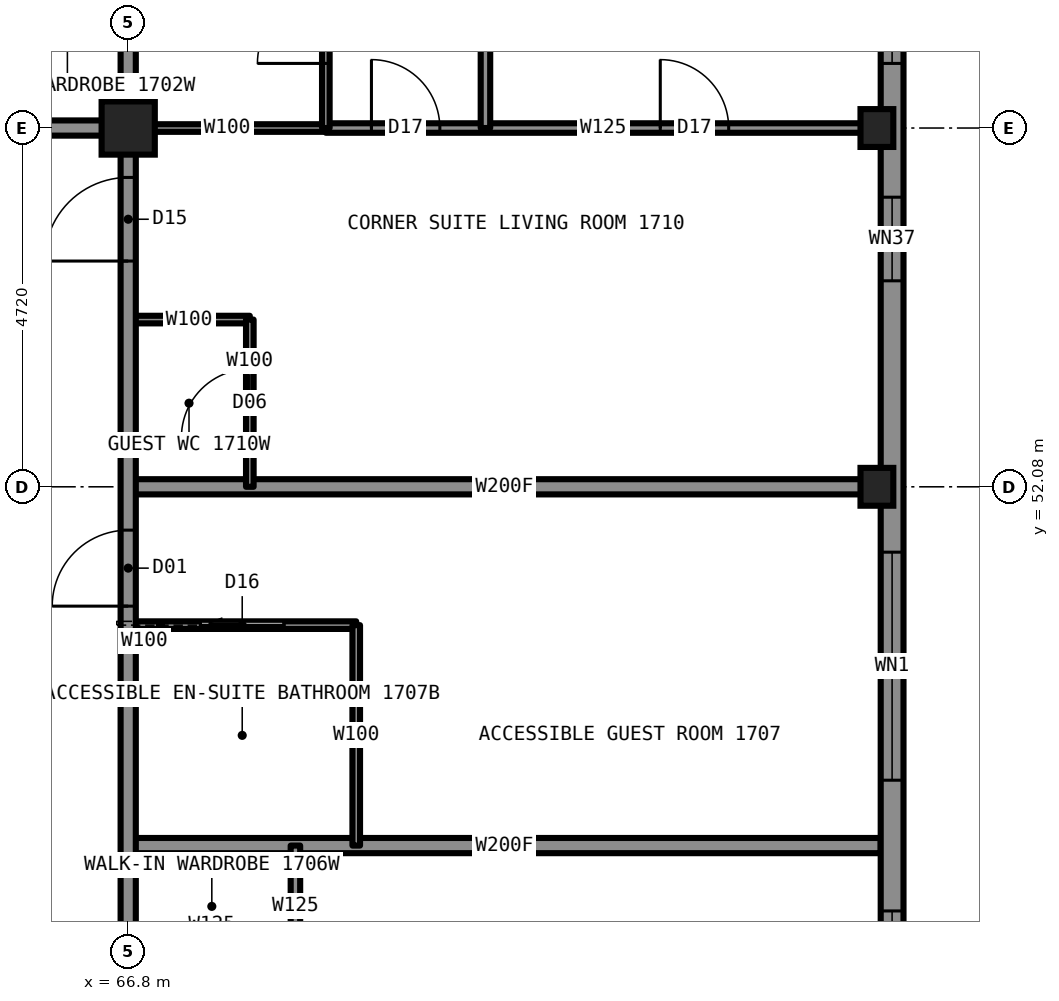
"""IFC4 building model, lengths in metres.
Left out: names, types, materials, properties, quantities, classifications, styles, units other than length and angle.
Written with IfcOpenShell. Run it as: python <this file> out.ifc"""

import sys

from ifc_helpers import new_model, si_unit, direction, frame, frame_2d, origin, origin_2d, place, context, subcontext, project, spatial, rectangle, hollow_rectangle, i_section, extrude, element, fill, save


model = new_model("IFC4")
c1 = context("Model", 3, precision=1e-05, world=origin(), true_north=direction((0.0, 1.0)))
c2 = subcontext(c1, "Body", "Model", "MODEL_VIEW")
j1 = project(units=[si_unit("LENGTHUNIT", "METRE"), si_unit("PLANEANGLEUNIT", "RADIAN")], contexts=[c1])
p1 = place(None, origin())
s1 = spatial("IfcSite", under=j1, at=p1, CompositionType="ELEMENT")
p2 = place(p1, origin())
s2 = spatial("IfcBuilding", under=s1, at=p2, CompositionType="ELEMENT")
p3 = place(p2, frame((0.0, 0.0, 60.0)))
s3 = spatial("IfcBuildingStorey", under=s2, at=p3, CompositionType="ELEMENT", Elevation=60.0)
for number, where, z_axis, x_axis in (
    (1, (76.65, 52.08, 0.0), (0.0, 0.0, 1.0), (1.0, 0.0, 0.0)),
    (2, (76.65, 56.8, 0.0), (0.0, 0.0, 1.0), (1.0, 0.0, 0.0)),
):
    element("IfcColumn", number, at=place(p3, frame(where, z_axis=z_axis, x_axis=x_axis)), inside=s3, PredefinedType="COLUMN", context=c2, shape_type="SweptSolid", body=[
        extrude(i_section(OverallWidth=0.432, OverallDepth=0.498, WebThickness=0.056, FlangeThickness=0.089, at=origin_2d()), origin(), (0.0, 0.0, 1.0), 3.5),
    ])
p4 = place(p3, frame((66.8, 56.8, 0.0), z_axis=(0.0, 0.0, 1.0), x_axis=(1.0, 0.0, 0.0)))
e3 = element("IfcColumn", 3, at=p4, inside=s3, PredefinedType="COLUMN", context=c2, shape_type="SweptSolid", body=[
    extrude(hollow_rectangle(XDim=0.7, YDim=0.7, WallThickness=0.06, at=origin_2d()), origin(), (0.0, 0.0, 1.0), 3.5),
])
p5 = place(p3, frame((66.8, 56.8, 0.0), z_axis=(0.0, 0.0, 1.0), x_axis=(1.0, 0.0, 0.0)))
e4 = element("IfcWall", 4, at=p5, inside=s3, PredefinedType="PARTITIONING", context=c2, shape_type="SweptSolid", body=[
    extrude(rectangle(XDim=2.6, YDim=0.1, at=frame_2d((1.3, 0.0))), origin(), (0.0, 0.0, 1.0), 2.573),
])
p6 = place(p3, frame((43.2, 56.8, 0.0), z_axis=(0.0, 0.0, 1.0), x_axis=(1.0, 0.0, 0.0)))
e5 = element("IfcWall", 5, at=p6, inside=s3, PredefinedType="PARTITIONING", context=c2, shape_type="SweptSolid", body=[
    extrude(rectangle(XDim=23.6, YDim=0.2, at=frame_2d((11.8, 0.0))), origin(), (0.0, 0.0, 1.0), 3.33),
])
p7 = place(p6, frame((1.85, 0.0, 0.0)))
e6 = element("IfcOpeningElement", 6, at=p7, cuts=e5, PredefinedType="OPENING", context=c2, shape_type="SweptSolid", body=[
    extrude(rectangle(XDim=1.1, YDim=2.2, at=frame_2d((0.55, 1.1))), frame((0.0, 0.11, 0.0), z_axis=(0.0, -1.0, 0.0), x_axis=(1.0, 0.0, 0.0)), (0.0, 0.0, 1.0), 0.22),
])
p8 = place(p6, frame((17.16, 0.0, 0.0)))
e7 = element("IfcOpeningElement", 7, at=p8, cuts=e5, PredefinedType="OPENING", context=c2, shape_type="SweptSolid", body=[
    extrude(rectangle(XDim=1.0, YDim=2.2, at=frame_2d((0.5, 1.1))), frame((0.0, 0.11, 0.0), z_axis=(0.0, -1.0, 0.0), x_axis=(1.0, 0.0, 0.0)), (0.0, 0.0, 1.0), 0.22),
])
p9 = place(p3, frame((69.4, 56.8, 0.0), z_axis=(0.0, 0.0, 1.0), x_axis=(1.0, 0.0, 0.0)))
e8 = element("IfcWall", 8, at=p9, inside=s3, PredefinedType="PARTITIONING", context=c2, shape_type="SweptSolid", body=[
    extrude(rectangle(XDim=7.3, YDim=0.125, at=frame_2d((3.65, 0.0))), origin(), (0.0, 0.0, 1.0), 2.573),
])
p10 = place(p9, frame((0.6, 0.0, 0.0)))
e9 = element("IfcOpeningElement", 9, at=p10, cuts=e8, PredefinedType="OPENING", context=c2, shape_type="SweptSolid", body=[
    extrude(rectangle(XDim=0.9, YDim=2.2, at=frame_2d((0.45, 1.1))), frame((0.0, 0.073, 0.0), z_axis=(0.0, -1.0, 0.0), x_axis=(1.0, 0.0, 0.0)), (0.0, 0.0, 1.0), 0.145),
])
p11 = place(p9, frame((4.4, 0.0, 0.0)))
e10 = element("IfcOpeningElement", 10, at=p11, cuts=e8, PredefinedType="OPENING", context=c2, shape_type="SweptSolid", body=[
    extrude(rectangle(XDim=0.9, YDim=2.2, at=frame_2d((0.45, 1.1))), frame((0.0, 0.073, 0.0), z_axis=(0.0, -1.0, 0.0), x_axis=(1.0, 0.0, 0.0)), (0.0, 0.0, 1.0), 0.145),
])
p12 = place(p3, frame((66.8, 47.36, 0.0), z_axis=(0.0, 0.0, 1.0), x_axis=(1.0, 0.0, 0.0)))
e11 = element("IfcWall", 11, at=p12, inside=s3, PredefinedType="PARTITIONING", context=c2, shape_type="SweptSolid", body=[
    extrude(rectangle(XDim=9.9, YDim=0.2, at=frame_2d((4.95, 0.0))), origin(), (0.0, 0.0, 1.0), 2.723),
])
p13 = place(p3, frame((66.8, 50.26, 0.0), z_axis=(0.0, 0.0, 1.0), x_axis=(1.0, 0.0, 0.0)))
e12 = element("IfcWall", 12, at=p13, inside=s3, PredefinedType="PARTITIONING", context=c2, shape_type="SweptSolid", body=[
    extrude(rectangle(XDim=3.0, YDim=0.1, at=frame_2d((1.5, 0.0))), origin(), (0.0, 0.0, 1.0), 3.33),
])
p14 = place(p13, frame((0.95, 0.0, 0.0)))
e13 = element("IfcOpeningElement", 13, at=p14, cuts=e12, PredefinedType="OPENING", context=c2, shape_type="SweptSolid", body=[
    extrude(rectangle(XDim=1.1, YDim=2.1, at=frame_2d((0.55, 1.05))), frame((0.0, 0.06, 0.0), z_axis=(0.0, -1.0, 0.0), x_axis=(1.0, 0.0, 0.0)), (0.0, 0.0, 1.0), 0.12),
])
p15 = place(p3, frame((66.8, 52.08, 0.0), z_axis=(0.0, 0.0, 1.0), x_axis=(1.0, 0.0, 0.0)))
e14 = element("IfcWall", 14, at=p15, inside=s3, PredefinedType="PARTITIONING", context=c2, shape_type="SweptSolid", body=[
    extrude(rectangle(XDim=9.9, YDim=0.2, at=frame_2d((4.95, 0.0))), origin(), (0.0, 0.0, 1.0), 2.573),
])
p16 = place(p3, frame((66.8, 54.28, 0.0), z_axis=(0.0, 0.0, 1.0), x_axis=(1.0, 0.0, 0.0)))
e15 = element("IfcWall", 15, at=p16, inside=s3, PredefinedType="PARTITIONING", context=c2, shape_type="SweptSolid", body=[
    extrude(rectangle(XDim=1.6, YDim=0.1, at=frame_2d((0.8, 0.0))), origin(), (0.0, 0.0, 1.0), 2.723),
])
p17 = place(p3, frame((66.8, 33.22, 0.0), z_axis=(0.0, 0.0, 1.0), x_axis=(0.0, 1.0, 0.0)))
e16 = element("IfcWall", 16, at=p17, inside=s3, PredefinedType="PARTITIONING", context=c2, shape_type="SweptSolid", body=[
    extrude(rectangle(XDim=23.58, YDim=0.2, at=frame_2d((11.79, 0.0))), origin(), (0.0, 0.0, 1.0), 3.33),
])
p18 = place(p17, frame((7.7, 0.0, 0.0)))
e17 = element("IfcOpeningElement", 17, at=p18, cuts=e16, PredefinedType="OPENING", context=c2, shape_type="SweptSolid", body=[
    extrude(rectangle(XDim=1.0, YDim=2.2, at=frame_2d((0.5, 1.1))), frame((0.0, 0.11, 0.0), z_axis=(0.0, -1.0, 0.0), x_axis=(1.0, 0.0, 0.0)), (0.0, 0.0, 1.0), 0.22),
])
p19 = place(p17, frame((17.29, 0.0, 0.0)))
e18 = element("IfcOpeningElement", 18, at=p19, cuts=e16, PredefinedType="OPENING", context=c2, shape_type="SweptSolid", body=[
    extrude(rectangle(XDim=1.0, YDim=2.2, at=frame_2d((0.5, 1.1))), frame((0.0, 0.11, 0.0), z_axis=(0.0, -1.0, 0.0), x_axis=(1.0, 0.0, 0.0)), (0.0, 0.0, 1.0), 0.22),
])
p20 = place(p17, frame((21.83, 0.0, 0.0)))
e19 = element("IfcOpeningElement", 19, at=p20, cuts=e16, PredefinedType="OPENING", context=c2, shape_type="SweptSolid", body=[
    extrude(rectangle(XDim=1.1, YDim=2.2, at=frame_2d((0.55, 1.1))), frame((0.0, 0.11, 0.0), z_axis=(0.0, -1.0, 0.0), x_axis=(1.0, 0.0, 0.0)), (0.0, 0.0, 1.0), 0.22),
])
p21 = place(p17, frame((0.63, 0.0, 0.0)))
e20 = element("IfcOpeningElement", 20, at=p21, cuts=e16, PredefinedType="OPENING", context=c2, shape_type="SweptSolid", body=[
    extrude(rectangle(XDim=1.1, YDim=2.2, at=frame_2d((0.55, 1.1))), frame((0.0, 0.11, 0.0), z_axis=(0.0, -1.0, 0.0), x_axis=(1.0, 0.0, 0.0)), (0.0, 0.0, 1.0), 0.22),
])
p22 = place(p3, frame((66.8, 56.8, 0.0), z_axis=(0.0, 0.0, 1.0), x_axis=(0.0, 1.0, 0.0)))
e21 = element("IfcWall", 21, at=p22, inside=s3, PredefinedType="PARTITIONING", context=c2, shape_type="SweptSolid", body=[
    extrude(rectangle(XDim=9.9, YDim=0.2, at=frame_2d((4.95, 0.0))), origin(), (0.0, 0.0, 1.0), 2.573),
])
p23 = place(p3, frame((68.4, 52.08, 0.0), z_axis=(0.0, 0.0, 1.0), x_axis=(0.0, 1.0, 0.0)))
e22 = element("IfcWall", 22, at=p23, inside=s3, PredefinedType="PARTITIONING", context=c2, shape_type="SweptSolid", body=[
    extrude(rectangle(XDim=2.2, YDim=0.1, at=frame_2d((1.1, 0.0))), origin(), (0.0, 0.0, 1.0), 3.33),
])
p24 = place(p23, frame((0.65, 0.0, 0.0)))
e23 = element("IfcOpeningElement", 23, at=p24, cuts=e22, PredefinedType="OPENING", context=c2, shape_type="SweptSolid", body=[
    extrude(rectangle(XDim=0.9, YDim=2.1, at=frame_2d((0.45, 1.05))), frame((0.0, 0.06, 0.0), z_axis=(0.0, -1.0, 0.0), x_axis=(1.0, 0.0, 0.0)), (0.0, 0.0, 1.0), 0.12),
])
p25 = place(p3, frame((69.0, 45.76, 0.0), z_axis=(0.0, 0.0, 1.0), x_axis=(0.0, 1.0, 0.0)))
e24 = element("IfcWall", 24, at=p25, inside=s3, PredefinedType="PARTITIONING", context=c2, shape_type="SweptSolid", body=[
    extrude(rectangle(XDim=1.6, YDim=0.125, at=frame_2d((0.8, 0.0))), origin(), (0.0, 0.0, 1.0), 3.33),
])
p26 = place(p3, frame((69.4, 56.8, 0.0), z_axis=(0.0, 0.0, 1.0), x_axis=(0.0, 1.0, 0.0)))
e25 = element("IfcWall", 25, at=p26, inside=s3, PredefinedType="PARTITIONING", context=c2, shape_type="SweptSolid", body=[
    extrude(rectangle(XDim=2.6, YDim=0.1, at=frame_2d((1.3, 0.0))), origin(), (0.0, 0.0, 1.0), 3.33),
])
p27 = place(p26, frame((0.85, 0.0, 0.0)))
e26 = element("IfcOpeningElement", 26, at=p27, cuts=e25, PredefinedType="OPENING", context=c2, shape_type="SweptSolid", body=[
    extrude(rectangle(XDim=0.9, YDim=2.1, at=frame_2d((0.45, 1.05))), frame((0.0, 0.06, 0.0), z_axis=(0.0, -1.0, 0.0), x_axis=(1.0, 0.0, 0.0)), (0.0, 0.0, 1.0), 0.12),
])
p28 = place(p3, frame((69.8, 47.36, 0.0), z_axis=(0.0, 0.0, 1.0), x_axis=(0.0, 1.0, 0.0)))
e27 = element("IfcWall", 27, at=p28, inside=s3, PredefinedType="PARTITIONING", context=c2, shape_type="SweptSolid", body=[
    extrude(rectangle(XDim=2.9, YDim=0.1, at=frame_2d((1.45, 0.0))), origin(), (0.0, 0.0, 1.0), 3.33),
])
p29 = place(p3, frame((71.5, 56.8, 0.0), z_axis=(0.0, 0.0, 1.0), x_axis=(0.0, 1.0, 0.0)))
e28 = element("IfcWall", 28, at=p29, inside=s3, PredefinedType="PARTITIONING", context=c2, shape_type="SweptSolid", body=[
    extrude(rectangle(XDim=9.894, YDim=0.125, at=frame_2d((4.947, 0.0))), origin(), (0.0, 0.0, 1.0), 3.33),
])
p30 = place(p3, frame((76.85, 28.5, 0.0), z_axis=(0.0, 0.0, 1.0), x_axis=(0.0, 1.0, 0.0)))
e29 = element("IfcWall", 29, at=p30, inside=s3, PredefinedType="SOLIDWALL", context=c2, shape_type="SweptSolid", body=[
    extrude(rectangle(XDim=33.0, YDim=0.3, at=frame_2d((16.5, 0.0))), origin(), (0.0, 0.0, 1.0), 2.83),
])
p31 = place(p30, frame((0.85, 0.0, 0.5)))
e30 = element("IfcOpeningElement", 30, at=p31, cuts=e29, PredefinedType="OPENING", context=c2, shape_type="SweptSolid", body=[
    extrude(rectangle(XDim=3.0, YDim=2.0, at=frame_2d((1.5, 1.0))), frame((0.0, 0.16, 0.0), z_axis=(0.0, -1.0, 0.0), x_axis=(1.0, 0.0, 0.0)), (0.0, 0.0, 1.0), 0.32),
])
p32 = place(p30, frame((5.56, 0.0, 0.5)))
e31 = element("IfcOpeningElement", 31, at=p32, cuts=e29, PredefinedType="OPENING", context=c2, shape_type="SweptSolid", body=[
    extrude(rectangle(XDim=3.0, YDim=2.0, at=frame_2d((1.5, 1.0))), frame((0.0, 0.16, 0.0), z_axis=(0.0, -1.0, 0.0), x_axis=(1.0, 0.0, 0.0)), (0.0, 0.0, 1.0), 0.32),
])
p33 = place(p30, frame((10.28, 0.0, 0.5)))
e32 = element("IfcOpeningElement", 32, at=p33, cuts=e29, PredefinedType="OPENING", context=c2, shape_type="SweptSolid", body=[
    extrude(rectangle(XDim=1.2, YDim=1.7, at=frame_2d((0.6, 0.85))), frame((0.0, 0.16, 0.0), z_axis=(0.0, -1.0, 0.0), x_axis=(1.0, 0.0, 0.0)), (0.0, 0.0, 1.0), 0.32),
])
p34 = place(p30, frame((15.0, 0.0, 0.5)))
e33 = element("IfcOpeningElement", 33, at=p34, cuts=e29, PredefinedType="OPENING", context=c2, shape_type="SweptSolid", body=[
    extrude(rectangle(XDim=3.0, YDim=2.0, at=frame_2d((1.5, 1.0))), frame((0.0, 0.16, 0.0), z_axis=(0.0, -1.0, 0.0), x_axis=(1.0, 0.0, 0.0)), (0.0, 0.0, 1.0), 0.32),
])
p35 = place(p30, frame((21.52, 0.0, 0.5)))
e34 = element("IfcOpeningElement", 34, at=p35, cuts=e29, PredefinedType="OPENING", context=c2, shape_type="SweptSolid", body=[
    extrude(rectangle(XDim=1.2, YDim=1.7, at=frame_2d((0.6, 0.85))), frame((0.0, 0.16, 0.0), z_axis=(0.0, -1.0, 0.0), x_axis=(1.0, 0.0, 0.0)), (0.0, 0.0, 1.0), 0.32),
])
p36 = place(p30, frame((24.44, 0.0, 0.5)))
e35 = element("IfcOpeningElement", 35, at=p36, cuts=e29, PredefinedType="OPENING", context=c2, shape_type="SweptSolid", body=[
    extrude(rectangle(XDim=3.0, YDim=2.0, at=frame_2d((1.5, 1.0))), frame((0.0, 0.16, 0.0), z_axis=(0.0, -1.0, 0.0), x_axis=(1.0, 0.0, 0.0)), (0.0, 0.0, 1.0), 0.32),
])
p37 = place(p30, frame((29.15, 0.0, 0.5)))
e36 = element("IfcOpeningElement", 36, at=p37, cuts=e29, PredefinedType="OPENING", context=c2, shape_type="SweptSolid", body=[
    extrude(rectangle(XDim=3.0, YDim=2.0, at=frame_2d((1.5, 1.0))), frame((0.0, 0.16, 0.0), z_axis=(0.0, -1.0, 0.0), x_axis=(1.0, 0.0, 0.0)), (0.0, 0.0, 1.0), 0.32),
])
p38 = place(p30, frame((11.48, 0.0, 0.5)))
e37 = element("IfcOpeningElement", 37, at=p38, cuts=e29, PredefinedType="OPENING", context=c2, shape_type="SweptSolid", body=[
    extrude(rectangle(XDim=0.6, YDim=0.8, at=frame_2d((0.3, 0.4))), frame((0.0, 0.16, 0.0), z_axis=(0.0, -1.0, 0.0), x_axis=(1.0, 0.0, 0.0)), (0.0, 0.0, 1.0), 0.32),
])
p39 = place(p30, frame((20.87, 0.0, 0.5)))
e38 = element("IfcOpeningElement", 38, at=p39, cuts=e29, PredefinedType="OPENING", context=c2, shape_type="SweptSolid", body=[
    extrude(rectangle(XDim=0.6, YDim=0.8, at=frame_2d((0.3, 0.4))), frame((0.0, 0.16, 0.0), z_axis=(0.0, -1.0, 0.0), x_axis=(1.0, 0.0, 0.0)), (0.0, 0.0, 1.0), 0.32),
])
p40 = place(p19, origin())
e39 = element("IfcDoor", 39, at=p40, inside=s3, OperationType="SINGLE_SWING_LEFT", PredefinedType="DOOR", context=c2, shape_type="SweptSolid", body=[
    extrude(rectangle(XDim=1.0, YDim=2.2, at=frame_2d((0.5, 1.1))), frame((0.0, 0.025, 0.0), z_axis=(0.0, -1.0, 0.0), x_axis=(1.0, 0.0, 0.0)), (0.0, 0.0, 1.0), 0.05),
])
fill(e18, e39)
p41 = place(p14, origin())
e40 = element("IfcDoor", 40, at=p41, inside=s3, OperationType="SLIDING_TO_LEFT", PredefinedType="DOOR", context=c2, shape_type="SweptSolid", body=[
    extrude(rectangle(XDim=1.1, YDim=2.1, at=frame_2d((0.55, 1.05))), frame((0.0, 0.025, 0.0), z_axis=(0.0, -1.0, 0.0), x_axis=(1.0, 0.0, 0.0)), (0.0, 0.0, 1.0), 0.05),
])
fill(e13, e40)
p42 = place(p20, origin())
e41 = element("IfcDoor", 41, at=p42, inside=s3, OperationType="SINGLE_SWING_LEFT", PredefinedType="DOOR", context=c2, shape_type="SweptSolid", body=[
    extrude(rectangle(XDim=1.1, YDim=2.2, at=frame_2d((0.55, 1.1))), frame((0.0, 0.025, 0.0), z_axis=(0.0, -1.0, 0.0), x_axis=(1.0, 0.0, 0.0)), (0.0, 0.0, 1.0), 0.05),
])
fill(e19, e41)
p43 = place(p27, origin())
e42 = element("IfcDoor", 42, at=p43, inside=s3, OperationType="SINGLE_SWING_RIGHT", PredefinedType="DOOR", context=c2, shape_type="SweptSolid", body=[
    extrude(rectangle(XDim=0.9, YDim=2.1, at=frame_2d((0.45, 1.05))), frame((0.0, 0.025, 0.0), z_axis=(0.0, -1.0, 0.0), x_axis=(1.0, 0.0, 0.0)), (0.0, 0.0, 1.0), 0.05),
])
fill(e26, e42)
p44 = place(p10, origin())
e43 = element("IfcDoor", 43, at=p44, inside=s3, OperationType="SINGLE_SWING_LEFT", PredefinedType="DOOR", context=c2, shape_type="SweptSolid", body=[
    extrude(rectangle(XDim=0.9, YDim=2.2, at=frame_2d((0.45, 1.1))), frame((0.0, 0.025, 0.0), z_axis=(0.0, -1.0, 0.0), x_axis=(1.0, 0.0, 0.0)), (0.0, 0.0, 1.0), 0.05),
])
fill(e9, e43)
p45 = place(p11, origin())
e44 = element("IfcDoor", 44, at=p45, inside=s3, OperationType="SINGLE_SWING_LEFT", PredefinedType="DOOR", context=c2, shape_type="SweptSolid", body=[
    extrude(rectangle(XDim=0.9, YDim=2.2, at=frame_2d((0.45, 1.1))), frame((0.0, 0.025, 0.0), z_axis=(0.0, -1.0, 0.0), x_axis=(1.0, 0.0, 0.0)), (0.0, 0.0, 1.0), 0.05),
])
fill(e10, e44)
p46 = place(p24, origin())
e45 = element("IfcDoor", 45, at=p46, inside=s3, OperationType="SINGLE_SWING_LEFT", PredefinedType="DOOR", context=c2, shape_type="SweptSolid", body=[
    extrude(rectangle(XDim=0.9, YDim=2.1, at=frame_2d((0.45, 1.05))), frame((0.0, 0.025, 0.0), z_axis=(0.0, -1.0, 0.0), x_axis=(1.0, 0.0, 0.0)), (0.0, 0.0, 1.0), 0.05),
])
fill(e23, e45)
p47 = place(p34, origin())
e46 = element("IfcWindow", 46, at=p47, inside=s3, PartitioningType="SINGLE_PANEL", PredefinedType="WINDOW", context=c2, shape_type="SweptSolid", body=[
    extrude(rectangle(XDim=3.0, YDim=2.0, at=frame_2d((1.5, 1.0))), frame((0.0, 0.03, 0.0), z_axis=(0.0, -1.0, 0.0), x_axis=(1.0, 0.0, 0.0)), (0.0, 0.0, 1.0), 0.06),
])
fill(e33, e46)
p48 = place(p35, origin())
e47 = element("IfcWindow", 47, at=p48, inside=s3, PartitioningType="SINGLE_PANEL", PredefinedType="WINDOW", context=c2, shape_type="SweptSolid", body=[
    extrude(rectangle(XDim=1.2, YDim=1.7, at=frame_2d((0.6, 0.85))), frame((0.0, 0.03, 0.0), z_axis=(0.0, -1.0, 0.0), x_axis=(1.0, 0.0, 0.0)), (0.0, 0.0, 1.0), 0.06),
])
fill(e34, e47)
p49 = place(p36, origin())
e48 = element("IfcWindow", 48, at=p49, inside=s3, PartitioningType="SINGLE_PANEL", PredefinedType="WINDOW", context=c2, shape_type="SweptSolid", body=[
    extrude(rectangle(XDim=3.0, YDim=2.0, at=frame_2d((1.5, 1.0))), frame((0.0, 0.03, 0.0), z_axis=(0.0, -1.0, 0.0), x_axis=(1.0, 0.0, 0.0)), (0.0, 0.0, 1.0), 0.06),
])
fill(e35, e48)
p50 = place(p37, origin())
e49 = element("IfcWindow", 49, at=p50, inside=s3, PartitioningType="SINGLE_PANEL", PredefinedType="WINDOW", context=c2, shape_type="SweptSolid", body=[
    extrude(rectangle(XDim=3.0, YDim=2.0, at=frame_2d((1.5, 1.0))), frame((0.0, 0.03, 0.0), z_axis=(0.0, -1.0, 0.0), x_axis=(1.0, 0.0, 0.0)), (0.0, 0.0, 1.0), 0.06),
])
fill(e36, e49)
p51 = place(p39, origin())
e50 = element("IfcWindow", 50, at=p51, inside=s3, PartitioningType="SINGLE_PANEL", PredefinedType="WINDOW", context=c2, shape_type="SweptSolid", body=[
    extrude(rectangle(XDim=0.6, YDim=0.8, at=frame_2d((0.3, 0.4))), frame((0.0, 0.03, 0.0), z_axis=(0.0, -1.0, 0.0), x_axis=(1.0, 0.0, 0.0)), (0.0, 0.0, 1.0), 0.06),
])
fill(e38, e50)
save(model, sys.argv[1])
